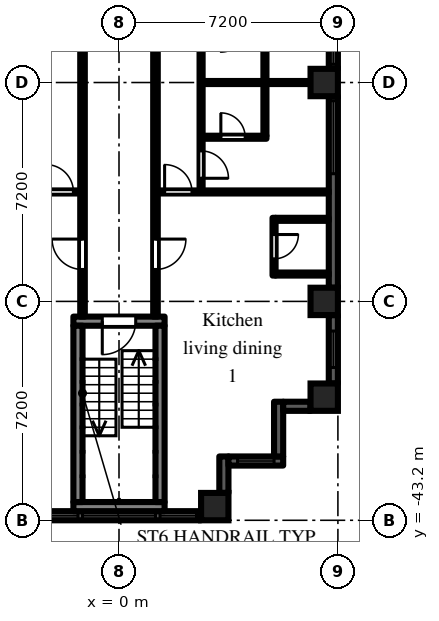
"""IFC4 building model, lengths in metres.
Left out: names, types, materials, properties, quantities, classifications, styles, units other than length and angle.
Written with IfcOpenShell. Run it as: python <this file> out.ifc"""

import sys

from ifc_helpers import new_model, si_unit, direction, frame, frame_2d, origin, origin_2d, place, context, subcontext, project, spatial, rectangle, extrude, element, fill, save


model = new_model("IFC4")
c1 = context("Model", 3, precision=1e-05, world=origin(), true_north=direction((0.0, 1.0)))
c2 = subcontext(c1, "Body", "Model", "MODEL_VIEW")
j1 = project(units=[si_unit("LENGTHUNIT", "METRE"), si_unit("PLANEANGLEUNIT", "RADIAN")], contexts=[c1])
p1 = place(None, origin())
s1 = spatial("IfcSite", under=j1, at=p1, CompositionType="ELEMENT")
p2 = place(p1, origin())
s2 = spatial("IfcBuilding", under=s1, at=p2, CompositionType="ELEMENT")
p3 = place(p2, frame((0.0, 0.0, 66.9)))
s3 = spatial("IfcBuildingStorey", under=s2, at=p3, CompositionType="ELEMENT", Elevation=66.9)
for number, where, z_axis, x_axis in (
    (1, (3.15, -42.75, 0.0), (0.0, 0.0, 1.0), (1.0, 0.0, 0.0)),
    (2, (6.75, -39.15, 0.0), (0.0, 0.0, 1.0), (1.0, 0.0, 0.0)),
    (3, (6.75, -36.0, 0.0), (0.0, 0.0, 1.0), (1.0, 0.0, 0.0)),
    (4, (6.75, -28.8, 0.0), (0.0, 0.0, 1.0), (1.0, 0.0, 0.0)),
):
    element("IfcColumn", number, at=place(p3, frame(where, z_axis=z_axis, x_axis=x_axis)), inside=s3, PredefinedType="COLUMN", context=c2, shape_type="SweptSolid", body=[
        extrude(rectangle(XDim=0.9, YDim=0.9, at=origin_2d()), origin(), (0.0, 0.0, 1.0), 3.0),
    ])
p4 = place(p3, frame((-2.7, -43.05, 0.0), z_axis=(0.0, 0.0, 1.0), x_axis=(1.0, 0.0, 0.0)))
e5 = element("IfcWall", 5, at=p4, inside=s3, PredefinedType="SOLIDWALL", context=c2, shape_type="SweptSolid", body=[
    extrude(rectangle(XDim=5.4, YDim=0.3, at=frame_2d((2.7, 0.0))), origin(), (0.0, 0.0, 1.0), 2.1),
])
p5 = place(p4, frame((1.5, 0.0, 0.2)))
e6 = element("IfcOpeningElement", 6, at=p5, cuts=e5, PredefinedType="OPENING", context=c2, shape_type="SweptSolid", body=[
    extrude(rectangle(XDim=2.4, YDim=1.85, at=frame_2d((1.2, 0.925))), frame((0.0, 0.16, 0.0), z_axis=(0.0, -1.0, 0.0), x_axis=(1.0, 0.0, 0.0)), (0.0, 0.0, 1.0), 0.32),
])
p6 = place(p4, frame((0.15, 0.0, 0.2)))
e7 = element("IfcOpeningElement", 7, at=p6, cuts=e5, PredefinedType="OPENING", context=c2, shape_type="SweptSolid", body=[
    extrude(rectangle(XDim=1.2, YDim=1.85, at=frame_2d((0.6, 0.925))), frame((0.0, 0.16, 0.0), z_axis=(0.0, -1.0, 0.0), x_axis=(1.0, 0.0, 0.0)), (0.0, 0.0, 1.0), 0.32),
])
p7 = place(p4, frame((4.05, 0.0, 0.2)))
e8 = element("IfcOpeningElement", 8, at=p7, cuts=e5, PredefinedType="OPENING", context=c2, shape_type="SweptSolid", body=[
    extrude(rectangle(XDim=1.2, YDim=1.85, at=frame_2d((0.6, 0.925))), frame((0.0, 0.16, 0.0), z_axis=(0.0, -1.0, 0.0), x_axis=(1.0, 0.0, 0.0)), (0.0, 0.0, 1.0), 0.32),
])
p8 = place(p3, frame((3.45, -42.3, 0.0), z_axis=(0.0, 0.0, 1.0), x_axis=(0.0, 1.0, 0.0)))
e9 = element("IfcWall", 9, at=p8, inside=s3, PredefinedType="SOLIDWALL", context=c2, shape_type="SweptSolid", body=[
    extrude(rectangle(XDim=1.2, YDim=0.3, at=frame_2d((0.6, 0.0))), origin(), (0.0, 0.0, 1.0), 2.575),
])
p9 = place(p3, frame((3.6, -41.25, 0.0), z_axis=(0.0, 0.0, 1.0), x_axis=(1.0, 0.0, 0.0)))
e10 = element("IfcWall", 10, at=p9, inside=s3, PredefinedType="SOLIDWALL", context=c2, shape_type="SweptSolid", body=[
    extrude(rectangle(XDim=1.8, YDim=0.3, at=frame_2d((0.9, 0.0))), origin(), (0.0, 0.0, 1.0), 2.575),
])
p10 = place(p9, frame((0.3, 0.0, 0.2)))
e11 = element("IfcOpeningElement", 11, at=p10, cuts=e10, PredefinedType="OPENING", context=c2, shape_type="SweptSolid", body=[
    extrude(rectangle(XDim=1.2, YDim=1.85, at=frame_2d((0.6, 0.925))), frame((0.0, 0.16, 0.0), z_axis=(0.0, -1.0, 0.0), x_axis=(1.0, 0.0, 0.0)), (0.0, 0.0, 1.0), 0.32),
])
p11 = place(p3, frame((5.25, -41.1, 0.0), z_axis=(0.0, 0.0, 1.0), x_axis=(0.0, 1.0, 0.0)))
e12 = element("IfcWall", 12, at=p11, inside=s3, PredefinedType="SOLIDWALL", context=c2, shape_type="SweptSolid", body=[
    extrude(rectangle(XDim=1.8, YDim=0.3, at=frame_2d((0.9, 0.0))), origin(), (0.0, 0.0, 1.0), 2.575),
])
p12 = place(p3, frame((5.4, -39.45, 0.0), z_axis=(0.0, 0.0, 1.0), x_axis=(1.0, 0.0, 0.0)))
e13 = element("IfcWall", 13, at=p12, inside=s3, PredefinedType="SOLIDWALL", context=c2, shape_type="SweptSolid", body=[
    extrude(rectangle(XDim=0.9, YDim=0.3, at=frame_2d((0.45, 0.0))), origin(), (0.0, 0.0, 1.0), 2.575),
])
p13 = place(p3, frame((7.05, -38.7, 0.0), z_axis=(0.0, 0.0, 1.0), x_axis=(0.0, 1.0, 0.0)))
e14 = element("IfcWall", 14, at=p13, inside=s3, PredefinedType="SOLIDWALL", context=c2, shape_type="SweptSolid", body=[
    extrude(rectangle(XDim=2.25, YDim=0.3, at=frame_2d((1.125, 0.0))), origin(), (0.0, 0.0, 1.0), 2.1),
])
p14 = place(p13, frame((0.525, 0.0, 0.2)))
e15 = element("IfcOpeningElement", 15, at=p14, cuts=e14, PredefinedType="OPENING", context=c2, shape_type="SweptSolid", body=[
    extrude(rectangle(XDim=1.2, YDim=1.85, at=frame_2d((0.6, 0.925))), frame((0.0, 0.16, 0.0), z_axis=(0.0, -1.0, 0.0), x_axis=(1.0, 0.0, 0.0)), (0.0, 0.0, 1.0), 0.32),
])
p15 = place(p3, frame((7.05, -35.55, 0.0), z_axis=(0.0, 0.0, 1.0), x_axis=(0.0, 1.0, 0.0)))
e16 = element("IfcWall", 16, at=p15, inside=s3, PredefinedType="SOLIDWALL", context=c2, shape_type="SweptSolid", body=[
    extrude(rectangle(XDim=6.3, YDim=0.3, at=frame_2d((3.15, 0.0))), origin(), (0.0, 0.0, 1.0), 2.1),
])
p16 = place(p15, frame((3.75, 0.0, 0.2)))
e17 = element("IfcOpeningElement", 17, at=p16, cuts=e16, PredefinedType="OPENING", context=c2, shape_type="SweptSolid", body=[
    extrude(rectangle(XDim=2.4, YDim=1.85, at=frame_2d((1.2, 0.925))), frame((0.0, 0.16, 0.0), z_axis=(0.0, -1.0, 0.0), x_axis=(1.0, 0.0, 0.0)), (0.0, 0.0, 1.0), 0.32),
])
p17 = place(p3, frame((7.05, -28.35, 0.0), z_axis=(0.0, 0.0, 1.0), x_axis=(0.0, 1.0, 0.0)))
e18 = element("IfcWall", 18, at=p17, inside=s3, PredefinedType="SOLIDWALL", context=c2, shape_type="SweptSolid", body=[
    extrude(rectangle(XDim=6.3, YDim=0.3, at=frame_2d((3.15, 0.0))), origin(), (0.0, 0.0, 1.0), 2.1),
])
p18 = place(p17, frame((0.15, 0.0, 0.2)))
e19 = element("IfcOpeningElement", 19, at=p18, cuts=e18, PredefinedType="OPENING", context=c2, shape_type="SweptSolid", body=[
    extrude(rectangle(XDim=2.4, YDim=1.85, at=frame_2d((1.2, 0.925))), frame((0.0, 0.16, 0.0), z_axis=(0.0, -1.0, 0.0), x_axis=(1.0, 0.0, 0.0)), (0.0, 0.0, 1.0), 0.32),
])
p19 = place(p17, frame((3.75, 0.0, 0.2)))
e20 = element("IfcOpeningElement", 20, at=p19, cuts=e18, PredefinedType="OPENING", context=c2, shape_type="SweptSolid", body=[
    extrude(rectangle(XDim=2.4, YDim=1.85, at=frame_2d((1.2, 0.925))), frame((0.0, 0.16, 0.0), z_axis=(0.0, -1.0, 0.0), x_axis=(1.0, 0.0, 0.0)), (0.0, 0.0, 1.0), 0.32),
])
p20 = place(p3, frame((-1.5, -36.65, 0.0), z_axis=(0.0, 0.0, 1.0), x_axis=(1.0, 0.0, 0.0)))
e21 = element("IfcWall", 21, at=p20, inside=s3, PredefinedType="SHEAR", context=c2, shape_type="SweptSolid", body=[
    extrude(rectangle(XDim=3.0, YDim=0.3, at=frame_2d((1.5, 0.0))), origin(), (0.0, 0.0, 1.0), 2.575),
])
p21 = place(p20, frame((0.95, 0.0, 0.0)))
e22 = element("IfcOpeningElement", 22, at=p21, cuts=e21, PredefinedType="OPENING", context=c2, shape_type="SweptSolid", body=[
    extrude(rectangle(XDim=1.1, YDim=2.1, at=frame_2d((0.55, 1.05))), frame((0.0, 0.16, 0.0), z_axis=(0.0, -1.0, 0.0), x_axis=(1.0, 0.0, 0.0)), (0.0, 0.0, 1.0), 0.32),
])
p22 = place(p3, frame((-1.5, -42.75, 0.0), z_axis=(0.0, 0.0, 1.0), x_axis=(1.0, 0.0, 0.0)))
e23 = element("IfcWall", 23, at=p22, inside=s3, PredefinedType="SHEAR", context=c2, shape_type="SweptSolid", body=[
    extrude(rectangle(XDim=3.0, YDim=0.3, at=frame_2d((1.5, 0.0))), origin(), (0.0, 0.0, 1.0), 2.575),
])
for number, where, z_axis, x_axis in (
    (24, (-1.35, -36.8, 0.0), (0.0, 0.0, 1.0), (0.0, -1.0, 0.0)),
    (25, (1.35, -36.8, 0.0), (0.0, 0.0, 1.0), (0.0, -1.0, 0.0)),
):
    element("IfcWall", number, at=place(p3, frame(where, z_axis=z_axis, x_axis=x_axis)), inside=s3, PredefinedType="SHEAR", context=c2, shape_type="SweptSolid", body=[
        extrude(rectangle(XDim=5.8, YDim=0.3, at=frame_2d((2.9, 0.0))), origin(), (0.0, 0.0, 1.0), 2.575),
    ])
p23 = place(p3, frame((-6.9, -32.4, 0.0), z_axis=(0.0, 0.0, 1.0), x_axis=(1.0, 0.0, 0.0)))
e26 = element("IfcWall", 26, at=p23, inside=s3, PredefinedType="PARTITIONING", context=c2, shape_type="SweptSolid", body=[
    extrude(rectangle(XDim=5.625, YDim=0.1, at=frame_2d((2.812, 0.0))), origin(), (0.0, 0.0, 1.0), 2.575),
])
p24 = place(p23, frame((4.5, 0.0, 0.0)))
e27 = element("IfcOpeningElement", 27, at=p24, cuts=e26, PredefinedType="OPENING", context=c2, shape_type="SweptSolid", body=[
    extrude(rectangle(XDim=0.9, YDim=2.1, at=frame_2d((0.45, 1.05))), frame((0.0, 0.06, 0.0), z_axis=(0.0, -1.0, 0.0), x_axis=(1.0, 0.0, 0.0)), (0.0, 0.0, 1.0), 0.12),
])
p25 = place(p3, frame((-1.2, -36.5, 0.0), z_axis=(0.0, 0.0, 1.0), x_axis=(0.0, 1.0, 0.0)))
e28 = element("IfcWall", 28, at=p25, inside=s3, PredefinedType="PARTITIONING", context=c2, shape_type="SweptSolid", body=[
    extrude(rectangle(XDim=35.225, YDim=0.15, at=frame_2d((17.613, 0.0))), origin(), (0.0, 0.0, 1.0), 2.575),
])
p26 = place(p25, frame((31.85, 0.0, 0.0)))
e29 = element("IfcOpeningElement", 29, at=p26, cuts=e28, PredefinedType="OPENING", context=c2, shape_type="SweptSolid", body=[
    extrude(rectangle(XDim=0.9, YDim=2.1, at=frame_2d((0.45, 1.05))), frame((0.0, 0.085, 0.0), z_axis=(0.0, -1.0, 0.0), x_axis=(1.0, 0.0, 0.0)), (0.0, 0.0, 1.0), 0.17),
])
p27 = place(p25, frame((23.05, 0.0, 0.0)))
e30 = element("IfcOpeningElement", 30, at=p27, cuts=e28, PredefinedType="OPENING", context=c2, shape_type="SweptSolid", body=[
    extrude(rectangle(XDim=0.9, YDim=2.1, at=frame_2d((0.45, 1.05))), frame((0.0, 0.085, 0.0), z_axis=(0.0, -1.0, 0.0), x_axis=(1.0, 0.0, 0.0)), (0.0, 0.0, 1.0), 0.17),
])
p28 = place(p25, frame((26.65, 0.0, 0.0)))
e31 = element("IfcOpeningElement", 31, at=p28, cuts=e28, PredefinedType="OPENING", context=c2, shape_type="SweptSolid", body=[
    extrude(rectangle(XDim=0.9, YDim=2.1, at=frame_2d((0.45, 1.05))), frame((0.0, 0.085, 0.0), z_axis=(0.0, -1.0, 0.0), x_axis=(1.0, 0.0, 0.0)), (0.0, 0.0, 1.0), 0.17),
])
p29 = place(p25, frame((1.55, 0.0, 0.0)))
e32 = element("IfcOpeningElement", 32, at=p29, cuts=e28, PredefinedType="OPENING", context=c2, shape_type="SweptSolid", body=[
    extrude(rectangle(XDim=1.0, YDim=2.1, at=frame_2d((0.5, 1.05))), frame((0.0, 0.085, 0.0), z_axis=(0.0, -1.0, 0.0), x_axis=(1.0, 0.0, 0.0)), (0.0, 0.0, 1.0), 0.17),
])
p30 = place(p3, frame((1.2, -36.5, 0.0), z_axis=(0.0, 0.0, 1.0), x_axis=(0.0, 1.0, 0.0)))
e33 = element("IfcWall", 33, at=p30, inside=s3, PredefinedType="PARTITIONING", context=c2, shape_type="SweptSolid", body=[
    extrude(rectangle(XDim=35.375, YDim=0.15, at=frame_2d((17.688, 0.0))), origin(), (0.0, 0.0, 1.0), 2.575),
])
p31 = place(p30, frame((31.85, 0.0, 0.0)))
e34 = element("IfcOpeningElement", 34, at=p31, cuts=e33, PredefinedType="OPENING", context=c2, shape_type="SweptSolid", body=[
    extrude(rectangle(XDim=0.9, YDim=2.1, at=frame_2d((0.45, 1.05))), frame((0.0, 0.085, 0.0), z_axis=(0.0, -1.0, 0.0), x_axis=(1.0, 0.0, 0.0)), (0.0, 0.0, 1.0), 0.17),
])
p32 = place(p30, frame((23.05, 0.0, 0.0)))
e35 = element("IfcOpeningElement", 35, at=p32, cuts=e33, PredefinedType="OPENING", context=c2, shape_type="SweptSolid", body=[
    extrude(rectangle(XDim=0.9, YDim=2.1, at=frame_2d((0.45, 1.05))), frame((0.0, 0.085, 0.0), z_axis=(0.0, -1.0, 0.0), x_axis=(1.0, 0.0, 0.0)), (0.0, 0.0, 1.0), 0.17),
])
p33 = place(p30, frame((26.65, 0.0, 0.0)))
e36 = element("IfcOpeningElement", 36, at=p33, cuts=e33, PredefinedType="OPENING", context=c2, shape_type="SweptSolid", body=[
    extrude(rectangle(XDim=0.9, YDim=2.1, at=frame_2d((0.45, 1.05))), frame((0.0, 0.085, 0.0), z_axis=(0.0, -1.0, 0.0), x_axis=(1.0, 0.0, 0.0)), (0.0, 0.0, 1.0), 0.17),
])
p34 = place(p30, frame((20.5, 0.0, 0.0)))
e37 = element("IfcOpeningElement", 37, at=p34, cuts=e33, PredefinedType="OPENING", context=c2, shape_type="SweptSolid", body=[
    extrude(rectangle(XDim=1.0, YDim=2.1, at=frame_2d((0.5, 1.05))), frame((0.0, 0.085, 0.0), z_axis=(0.0, -1.0, 0.0), x_axis=(1.0, 0.0, 0.0)), (0.0, 0.0, 1.0), 0.17),
])
p35 = place(p30, frame((1.55, 0.0, 0.0)))
e38 = element("IfcOpeningElement", 38, at=p35, cuts=e33, PredefinedType="OPENING", context=c2, shape_type="SweptSolid", body=[
    extrude(rectangle(XDim=1.0, YDim=2.1, at=frame_2d((0.5, 1.05))), frame((0.0, 0.085, 0.0), z_axis=(0.0, -1.0, 0.0), x_axis=(1.0, 0.0, 0.0)), (0.0, 0.0, 1.0), 0.17),
])
p36 = place(p3, frame((1.275, -32.4, 0.0), z_axis=(0.0, 0.0, 1.0), x_axis=(1.0, 0.0, 0.0)))
e39 = element("IfcWall", 39, at=p36, inside=s3, PredefinedType="PARTITIONING", context=c2, shape_type="SweptSolid", body=[
    extrude(rectangle(XDim=5.625, YDim=0.1, at=frame_2d((2.812, 0.0))), origin(), (0.0, 0.0, 1.0), 2.575),
])
p37 = place(p36, frame((0.225, 0.0, 0.0)))
e40 = element("IfcOpeningElement", 40, at=p37, cuts=e39, PredefinedType="OPENING", context=c2, shape_type="SweptSolid", body=[
    extrude(rectangle(XDim=0.9, YDim=2.1, at=frame_2d((0.45, 1.05))), frame((0.0, 0.06, 0.0), z_axis=(0.0, -1.0, 0.0), x_axis=(1.0, 0.0, 0.0)), (0.0, 0.0, 1.0), 0.12),
])
p38 = place(p3, frame((2.7, -32.35, 0.0), z_axis=(0.0, 0.0, 1.0), x_axis=(0.0, 1.0, 0.0)))
e41 = element("IfcWall", 41, at=p38, inside=s3, PredefinedType="PARTITIONING", context=c2, shape_type="SweptSolid", body=[
    extrude(rectangle(XDim=14.25, YDim=0.1, at=frame_2d((7.125, 0.0))), origin(), (0.0, 0.0, 1.0), 2.575),
])
p39 = place(p38, frame((0.4, 0.0, 0.0)))
e42 = element("IfcOpeningElement", 42, at=p39, cuts=e41, PredefinedType="OPENING", context=c2, shape_type="SweptSolid", body=[
    extrude(rectangle(XDim=0.9, YDim=2.1, at=frame_2d((0.45, 1.05))), frame((0.0, 0.06, 0.0), z_axis=(0.0, -1.0, 0.0), x_axis=(1.0, 0.0, 0.0)), (0.0, 0.0, 1.0), 0.12),
])
p40 = place(p38, frame((5.8, 0.0, 0.0)))
e43 = element("IfcOpeningElement", 43, at=p40, cuts=e41, PredefinedType="OPENING", context=c2, shape_type="SweptSolid", body=[
    extrude(rectangle(XDim=0.9, YDim=2.1, at=frame_2d((0.45, 1.05))), frame((0.0, 0.06, 0.0), z_axis=(0.0, -1.0, 0.0), x_axis=(1.0, 0.0, 0.0)), (0.0, 0.0, 1.0), 0.12),
])
p41 = place(p38, frame((7.6, 0.0, 0.0)))
e44 = element("IfcOpeningElement", 44, at=p41, cuts=e41, PredefinedType="OPENING", context=c2, shape_type="SweptSolid", body=[
    extrude(rectangle(XDim=0.9, YDim=2.1, at=frame_2d((0.45, 1.05))), frame((0.0, 0.06, 0.0), z_axis=(0.0, -1.0, 0.0), x_axis=(1.0, 0.0, 0.0)), (0.0, 0.0, 1.0), 0.12),
])
p42 = place(p38, frame((13.0, 0.0, 0.0)))
e45 = element("IfcOpeningElement", 45, at=p42, cuts=e41, PredefinedType="OPENING", context=c2, shape_type="SweptSolid", body=[
    extrude(rectangle(XDim=0.9, YDim=2.1, at=frame_2d((0.45, 1.05))), frame((0.0, 0.06, 0.0), z_axis=(0.0, -1.0, 0.0), x_axis=(1.0, 0.0, 0.0)), (0.0, 0.0, 1.0), 0.12),
])
p43 = place(p3, frame((2.75, -30.6, 0.0), z_axis=(0.0, 0.0, 1.0), x_axis=(1.0, 0.0, 0.0)))
e46 = element("IfcWall", 46, at=p43, inside=s3, PredefinedType="PARTITIONING", context=c2, shape_type="SweptSolid", body=[
    extrude(rectangle(XDim=2.1, YDim=0.1, at=frame_2d((1.05, 0.0))), origin(), (0.0, 0.0, 1.0), 2.575),
])
p44 = place(p43, frame((0.6, 0.0, 0.0)))
e47 = element("IfcOpeningElement", 47, at=p44, cuts=e46, PredefinedType="OPENING", context=c2, shape_type="SweptSolid", body=[
    extrude(rectangle(XDim=0.8, YDim=2.1, at=frame_2d((0.4, 1.05))), frame((0.0, 0.06, 0.0), z_axis=(0.0, -1.0, 0.0), x_axis=(1.0, 0.0, 0.0)), (0.0, 0.0, 1.0), 0.12),
])
p45 = place(p3, frame((2.75, -28.8, 0.0), z_axis=(0.0, 0.0, 1.0), x_axis=(1.0, 0.0, 0.0)))
e48 = element("IfcWall", 48, at=p45, inside=s3, PredefinedType="PARTITIONING", context=c2, shape_type="SweptSolid", body=[
    extrude(rectangle(XDim=4.15, YDim=0.1, at=frame_2d((2.075, 0.0))), origin(), (0.0, 0.0, 1.0), 2.575),
])
p46 = place(p3, frame((4.8, -30.55, 0.0), z_axis=(0.0, 0.0, 1.0), x_axis=(0.0, 1.0, 0.0)))
e49 = element("IfcWall", 49, at=p46, inside=s3, PredefinedType="PARTITIONING", context=c2, shape_type="SweptSolid", body=[
    extrude(rectangle(XDim=3.5, YDim=0.1, at=frame_2d((1.75, 0.0))), origin(), (0.0, 0.0, 1.0), 2.575),
])
p47 = place(p3, frame((5.1, -35.15, 0.0), z_axis=(0.0, 0.0, 1.0), x_axis=(0.0, 1.0, 0.0)))
e50 = element("IfcWall", 50, at=p47, inside=s3, PredefinedType="PARTITIONING", context=c2, shape_type="SweptSolid", body=[
    extrude(rectangle(XDim=1.9, YDim=0.1, at=frame_2d((0.95, 0.0))), origin(), (0.0, 0.0, 1.0), 2.575),
])
p48 = place(p47, frame((0.55, 0.0, 0.0)))
e51 = element("IfcOpeningElement", 51, at=p48, cuts=e50, PredefinedType="OPENING", context=c2, shape_type="SweptSolid", body=[
    extrude(rectangle(XDim=0.8, YDim=2.1, at=frame_2d((0.4, 1.05))), frame((0.0, 0.06, 0.0), z_axis=(0.0, -1.0, 0.0), x_axis=(1.0, 0.0, 0.0)), (0.0, 0.0, 1.0), 0.12),
])
for number, where, z_axis, x_axis in (
    (52, (5.15, -35.1, 0.0), (0.0, 0.0, 1.0), (1.0, 0.0, 0.0)),
    (53, (5.15, -33.3, 0.0), (0.0, 0.0, 1.0), (1.0, 0.0, 0.0)),
):
    element("IfcWall", number, at=place(p3, frame(where, z_axis=z_axis, x_axis=x_axis)), inside=s3, PredefinedType="PARTITIONING", context=c2, shape_type="SweptSolid", body=[
        extrude(rectangle(XDim=1.75, YDim=0.1, at=frame_2d((0.875, 0.0))), origin(), (0.0, 0.0, 1.0), 2.575),
    ])
p49 = place(p5, origin())
e54 = element("IfcWindow", 54, at=p49, inside=s3, PartitioningType="SINGLE_PANEL", PredefinedType="WINDOW", context=c2, shape_type="SweptSolid", body=[
    extrude(rectangle(XDim=2.4, YDim=1.85, at=frame_2d((1.2, 0.925))), frame((0.0, 0.03, 0.0), z_axis=(0.0, -1.0, 0.0), x_axis=(1.0, 0.0, 0.0)), (0.0, 0.0, 1.0), 0.06),
])
fill(e6, e54)
p50 = place(p6, origin())
e55 = element("IfcWindow", 55, at=p50, inside=s3, PartitioningType="SINGLE_PANEL", PredefinedType="WINDOW", context=c2, shape_type="SweptSolid", body=[
    extrude(rectangle(XDim=1.2, YDim=1.85, at=frame_2d((0.6, 0.925))), frame((0.0, 0.03, 0.0), z_axis=(0.0, -1.0, 0.0), x_axis=(1.0, 0.0, 0.0)), (0.0, 0.0, 1.0), 0.06),
])
fill(e7, e55)
p51 = place(p7, origin())
e56 = element("IfcWindow", 56, at=p51, inside=s3, PartitioningType="SINGLE_PANEL", PredefinedType="WINDOW", context=c2, shape_type="SweptSolid", body=[
    extrude(rectangle(XDim=1.2, YDim=1.85, at=frame_2d((0.6, 0.925))), frame((0.0, 0.03, 0.0), z_axis=(0.0, -1.0, 0.0), x_axis=(1.0, 0.0, 0.0)), (0.0, 0.0, 1.0), 0.06),
])
fill(e8, e56)
p52 = place(p10, origin())
e57 = element("IfcWindow", 57, at=p52, inside=s3, PartitioningType="SINGLE_PANEL", PredefinedType="WINDOW", context=c2, shape_type="SweptSolid", body=[
    extrude(rectangle(XDim=1.2, YDim=1.85, at=frame_2d((0.6, 0.925))), frame((0.0, 0.03, 0.0), z_axis=(0.0, -1.0, 0.0), x_axis=(1.0, 0.0, 0.0)), (0.0, 0.0, 1.0), 0.06),
])
fill(e11, e57)
p53 = place(p14, origin())
e58 = element("IfcWindow", 58, at=p53, inside=s3, PartitioningType="SINGLE_PANEL", PredefinedType="WINDOW", context=c2, shape_type="SweptSolid", body=[
    extrude(rectangle(XDim=1.2, YDim=1.85, at=frame_2d((0.6, 0.925))), frame((0.0, 0.03, 0.0), z_axis=(0.0, -1.0, 0.0), x_axis=(1.0, 0.0, 0.0)), (0.0, 0.0, 1.0), 0.06),
])
fill(e15, e58)
p54 = place(p16, origin())
e59 = element("IfcWindow", 59, at=p54, inside=s3, PartitioningType="SINGLE_PANEL", PredefinedType="WINDOW", context=c2, shape_type="SweptSolid", body=[
    extrude(rectangle(XDim=2.4, YDim=1.85, at=frame_2d((1.2, 0.925))), frame((0.0, 0.03, 0.0), z_axis=(0.0, -1.0, 0.0), x_axis=(1.0, 0.0, 0.0)), (0.0, 0.0, 1.0), 0.06),
])
fill(e17, e59)
p55 = place(p18, origin())
e60 = element("IfcWindow", 60, at=p55, inside=s3, PartitioningType="SINGLE_PANEL", PredefinedType="WINDOW", context=c2, shape_type="SweptSolid", body=[
    extrude(rectangle(XDim=2.4, YDim=1.85, at=frame_2d((1.2, 0.925))), frame((0.0, 0.03, 0.0), z_axis=(0.0, -1.0, 0.0), x_axis=(1.0, 0.0, 0.0)), (0.0, 0.0, 1.0), 0.06),
])
fill(e19, e60)
p56 = place(p21, frame((1.1, 0.0, 0.0), z_axis=(0.0, 0.0, 1.0), x_axis=(-1.0, 0.0, 0.0)))
e61 = element("IfcDoor", 61, at=p56, inside=s3, OperationType="SINGLE_SWING_RIGHT", PredefinedType="DOOR", context=c2, shape_type="SweptSolid", body=[
    extrude(rectangle(XDim=1.1, YDim=2.1, at=frame_2d((0.55, 1.05))), frame((0.0, 0.025, 0.0), z_axis=(0.0, -1.0, 0.0), x_axis=(1.0, 0.0, 0.0)), (0.0, 0.0, 1.0), 0.05),
])
fill(e22, e61)
p57 = place(p48, frame((0.8, 0.0, 0.0), z_axis=(0.0, 0.0, 1.0), x_axis=(-1.0, 0.0, 0.0)))
e62 = element("IfcDoor", 62, at=p57, inside=s3, OperationType="SINGLE_SWING_LEFT", PredefinedType="DOOR", context=c2, shape_type="SweptSolid", body=[
    extrude(rectangle(XDim=0.8, YDim=2.1, at=frame_2d((0.4, 1.05))), frame((0.0, 0.025, 0.0), z_axis=(0.0, -1.0, 0.0), x_axis=(1.0, 0.0, 0.0)), (0.0, 0.0, 1.0), 0.05),
])
fill(e51, e62)
p58 = place(p35, frame((1.0, 0.0, 0.0), z_axis=(0.0, 0.0, 1.0), x_axis=(-1.0, 0.0, 0.0)))
e63 = element("IfcDoor", 63, at=p58, inside=s3, OperationType="SINGLE_SWING_LEFT", PredefinedType="DOOR", context=c2, shape_type="SweptSolid", body=[
    extrude(rectangle(XDim=1.0, YDim=2.1, at=frame_2d((0.5, 1.05))), frame((0.0, 0.025, 0.0), z_axis=(0.0, -1.0, 0.0), x_axis=(1.0, 0.0, 0.0)), (0.0, 0.0, 1.0), 0.05),
])
fill(e38, e63)
p59 = place(p37, origin())
e64 = element("IfcDoor", 64, at=p59, inside=s3, OperationType="SINGLE_SWING_LEFT", PredefinedType="DOOR", context=c2, shape_type="SweptSolid", body=[
    extrude(rectangle(XDim=0.9, YDim=2.1, at=frame_2d((0.45, 1.05))), frame((0.0, 0.025, 0.0), z_axis=(0.0, -1.0, 0.0), x_axis=(1.0, 0.0, 0.0)), (0.0, 0.0, 1.0), 0.05),
])
fill(e40, e64)
p60 = place(p39, frame((0.9, 0.0, 0.0), z_axis=(0.0, 0.0, 1.0), x_axis=(-1.0, 0.0, 0.0)))
e65 = element("IfcDoor", 65, at=p60, inside=s3, OperationType="SINGLE_SWING_RIGHT", PredefinedType="DOOR", context=c2, shape_type="SweptSolid", body=[
    extrude(rectangle(XDim=0.9, YDim=2.1, at=frame_2d((0.45, 1.05))), frame((0.0, 0.025, 0.0), z_axis=(0.0, -1.0, 0.0), x_axis=(1.0, 0.0, 0.0)), (0.0, 0.0, 1.0), 0.05),
])
fill(e42, e65)
p61 = place(p44, origin())
e66 = element("IfcDoor", 66, at=p61, inside=s3, OperationType="SINGLE_SWING_LEFT", PredefinedType="DOOR", context=c2, shape_type="SweptSolid", body=[
    extrude(rectangle(XDim=0.8, YDim=2.1, at=frame_2d((0.4, 1.05))), frame((0.0, 0.025, 0.0), z_axis=(0.0, -1.0, 0.0), x_axis=(1.0, 0.0, 0.0)), (0.0, 0.0, 1.0), 0.05),
])
fill(e47, e66)
p62 = place(p29, origin())
e67 = element("IfcDoor", 67, at=p62, inside=s3, OperationType="SINGLE_SWING_RIGHT", PredefinedType="DOOR", context=c2, shape_type="SweptSolid", body=[
    extrude(rectangle(XDim=1.0, YDim=2.1, at=frame_2d((0.5, 1.05))), frame((0.0, 0.025, 0.0), z_axis=(0.0, -1.0, 0.0), x_axis=(1.0, 0.0, 0.0)), (0.0, 0.0, 1.0), 0.05),
])
fill(e32, e67)
p63 = place(p24, origin())
e68 = element("IfcDoor", 68, at=p63, inside=s3, OperationType="SINGLE_SWING_LEFT", PredefinedType="DOOR", context=c2, shape_type="SweptSolid", body=[
    extrude(rectangle(XDim=0.9, YDim=2.1, at=frame_2d((0.45, 1.05))), frame((0.0, 0.025, 0.0), z_axis=(0.0, -1.0, 0.0), x_axis=(1.0, 0.0, 0.0)), (0.0, 0.0, 1.0), 0.05),
])
fill(e27, e68)
save(model, sys.argv[1])
